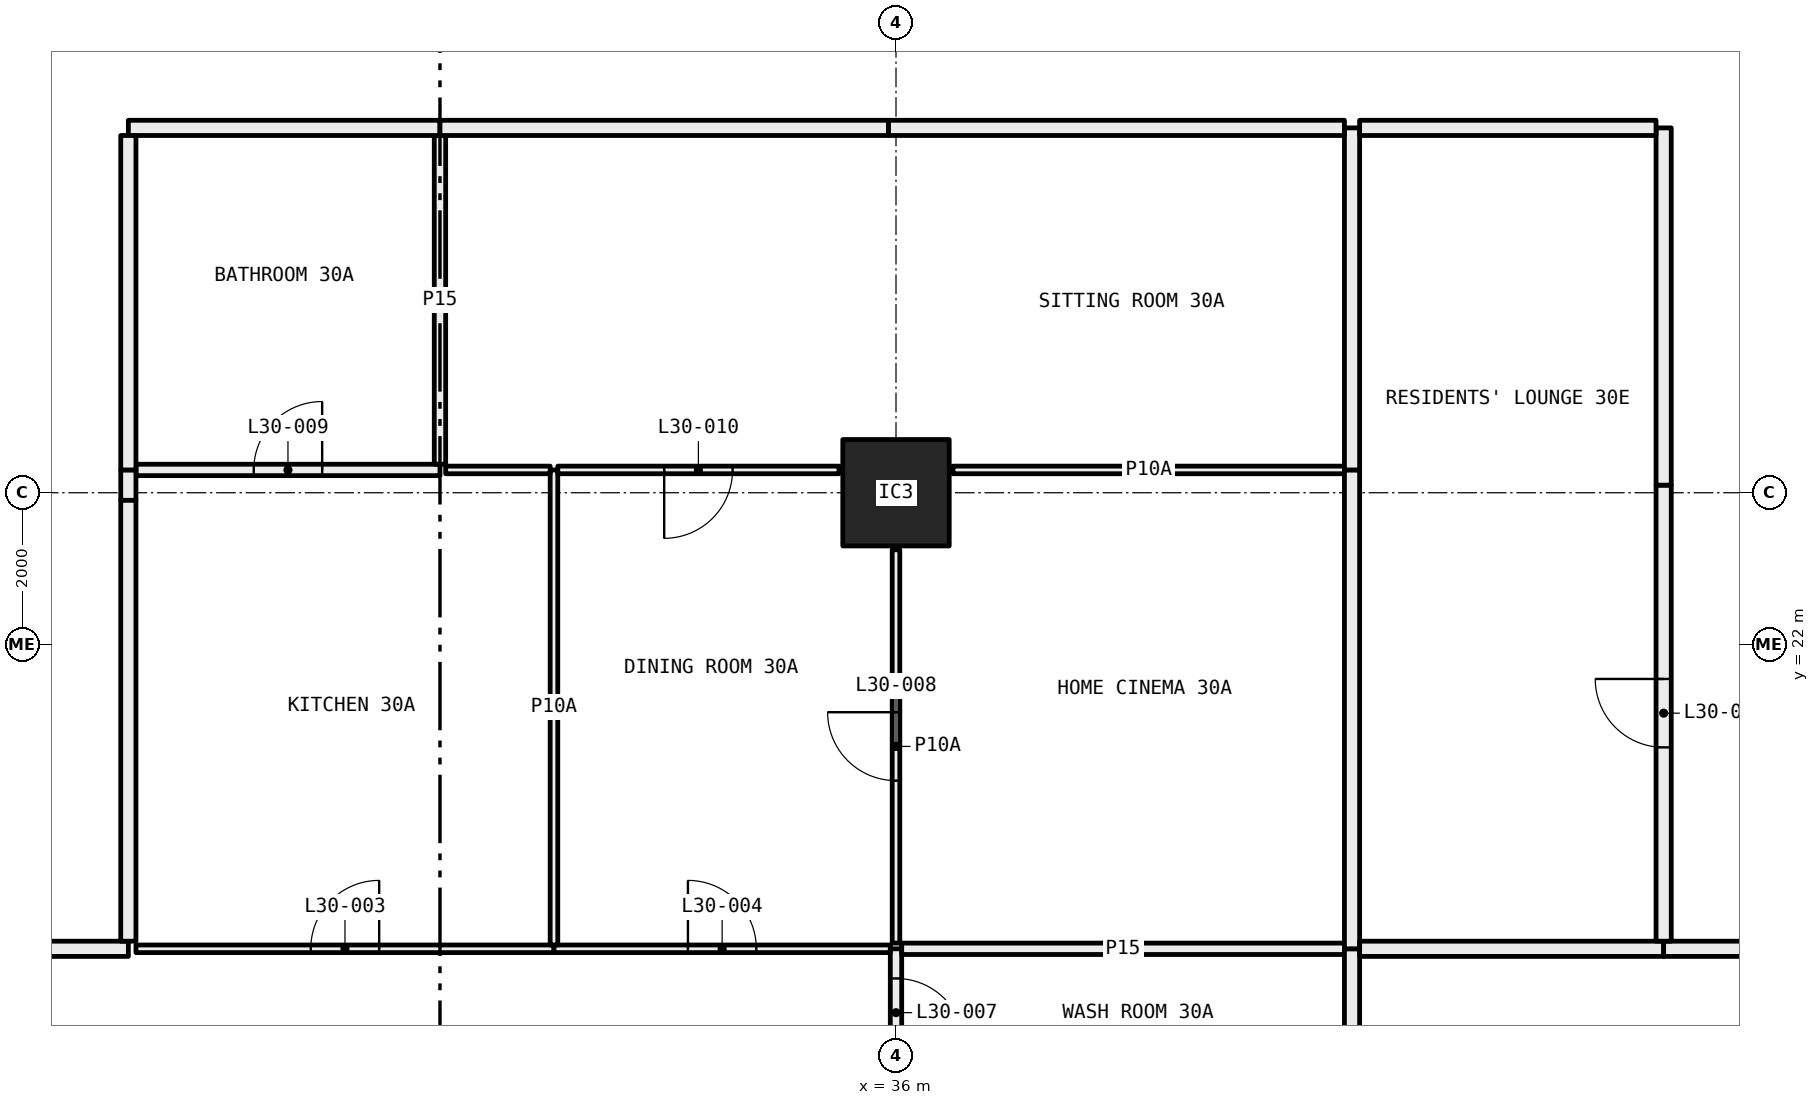
"""IFC4 building model, lengths in metres.
Left out: names, types, materials, properties, quantities, classifications, styles, units other than length and angle.
Written with IfcOpenShell. Run it as: python <this file> out.ifc"""

import sys

from ifc_helpers import new_model, si_unit, direction, frame, frame_2d, origin, origin_2d, place, context, subcontext, project, spatial, rectangle, hollow_rectangle, extrude, element, fill, save


model = new_model("IFC4")
c1 = context("Model", 3, precision=1e-05, world=origin(), true_north=direction((0.0, 1.0)))
c2 = subcontext(c1, "Body", "Model", "MODEL_VIEW")
j1 = project(units=[si_unit("LENGTHUNIT", "METRE"), si_unit("PLANEANGLEUNIT", "RADIAN")], contexts=[c1])
p1 = place(None, origin())
s1 = spatial("IfcSite", under=j1, at=p1, CompositionType="ELEMENT")
p2 = place(p1, origin())
s2 = spatial("IfcBuilding", under=s1, at=p2, CompositionType="ELEMENT")
p3 = place(p2, frame((0.0, 0.0, 117.3)))
s3 = spatial("IfcBuildingStorey", under=s2, at=p3, CompositionType="ELEMENT", Elevation=117.3)
p4 = place(p3, frame((36.0, 24.0, 0.0), z_axis=(0.0, 0.0, 1.0), x_axis=(1.0, 0.0, 0.0)))
e1 = element("IfcColumn", 1, at=p4, inside=s3, PredefinedType="COLUMN", context=c2, shape_type="SweptSolid", body=[
    extrude(hollow_rectangle(XDim=1.4, YDim=1.4, WallThickness=0.06, at=origin_2d()), origin(), (0.0, 0.0, 1.0), 3.05),
])
p5 = place(p3, frame((36.0, 16.32, 0.0), z_axis=(0.0, 0.0, 1.0), x_axis=(0.0, 1.0, 0.0)))
e2 = element("IfcWall", 2, at=p5, inside=s3, PredefinedType="PARTITIONING", context=c2, shape_type="SweptSolid", body=[
    extrude(rectangle(XDim=1.68, YDim=0.15, at=frame_2d((0.84, 0.0))), origin(), (0.0, 0.0, 1.0), 2.45),
])
p6 = place(p5, frame((0.39, 0.0, 0.0)))
e3 = element("IfcOpeningElement", 3, at=p6, cuts=e2, PredefinedType="OPENING", context=c2, shape_type="SweptSolid", body=[
    extrude(rectangle(XDim=0.9, YDim=2.1, at=frame_2d((0.45, 1.05))), frame((0.0, 0.085, 0.0), z_axis=(0.0, -1.0, 0.0), x_axis=(1.0, 0.0, 0.0)), (0.0, 0.0, 1.0), 0.17),
])
p7 = place(p3, frame((31.5, 18.0, 0.0), z_axis=(0.0, 0.0, 1.0), x_axis=(-1.0, 0.0, 0.0)))
e4 = element("IfcWall", 4, at=p7, inside=s3, PredefinedType="PARTITIONING", context=c2, shape_type="SweptSolid", body=[
    extrude(rectangle(XDim=5.5, YDim=0.1, at=frame_2d((2.75, 0.0))), origin(), (0.0, 0.0, 1.0), 3.05),
])
p8 = place(p7, frame((2.3, 0.0, 0.0)))
e5 = element("IfcOpeningElement", 5, at=p8, cuts=e4, PredefinedType="OPENING", context=c2, shape_type="SweptSolid", body=[
    extrude(rectangle(XDim=0.9, YDim=2.1, at=frame_2d((0.45, 1.05))), frame((0.0, 0.06, 0.0), z_axis=(0.0, -1.0, 0.0), x_axis=(1.0, 0.0, 0.0)), (0.0, 0.0, 1.0), 0.12),
])
p9 = place(p3, frame((35.925, 18.0, 0.0), z_axis=(0.0, 0.0, 1.0), x_axis=(-1.0, 0.0, 0.0)))
e6 = element("IfcWall", 6, at=p9, inside=s3, PredefinedType="PARTITIONING", context=c2, shape_type="SweptSolid", body=[
    extrude(rectangle(XDim=4.425, YDim=0.1, at=frame_2d((2.212, 0.0))), origin(), (0.0, 0.0, 1.0), 2.45),
])
p10 = place(p9, frame((1.762, 0.0, 0.0)))
e7 = element("IfcOpeningElement", 7, at=p10, cuts=e6, PredefinedType="OPENING", context=c2, shape_type="SweptSolid", body=[
    extrude(rectangle(XDim=0.9, YDim=2.1, at=frame_2d((0.45, 1.05))), frame((0.0, 0.06, 0.0), z_axis=(0.0, -1.0, 0.0), x_axis=(1.0, 0.0, 0.0)), (0.0, 0.0, 1.0), 0.12),
])
p11 = place(p3, frame((25.9, 18.0, 0.0), z_axis=(0.0, 0.0, 1.0), x_axis=(-1.0, 0.0, 0.0)))
e8 = element("IfcWall", 8, at=p11, inside=s3, PredefinedType="PARTITIONING", context=c2, shape_type="SweptSolid", body=[
    extrude(rectangle(XDim=1.9, YDim=0.2, at=frame_2d((0.95, 0.0))), origin(), (0.0, 0.0, 1.0), 3.05),
])
p12 = place(p3, frame((41.9, 18.0, 0.0), z_axis=(0.0, 0.0, 1.0), x_axis=(-1.0, 0.0, 0.0)))
e9 = element("IfcWall", 9, at=p12, inside=s3, PredefinedType="PARTITIONING", context=c2, shape_type="SweptSolid", body=[
    extrude(rectangle(XDim=5.825, YDim=0.15, at=frame_2d((2.913, 0.0))), origin(), (0.0, 0.0, 1.0), 2.45),
])
p13 = place(p3, frame((42.0, 16.32, 0.0), z_axis=(0.0, 0.0, 1.0), x_axis=(0.0, 1.0, 0.0)))
e10 = element("IfcWall", 10, at=p13, inside=s3, PredefinedType="PARTITIONING", context=c2, shape_type="SweptSolid", body=[
    extrude(rectangle(XDim=1.68, YDim=0.2, at=frame_2d((0.84, 0.0))), origin(), (0.0, 0.0, 1.0), 3.05),
])
p14 = place(p3, frame((31.5, 18.05, 0.0), z_axis=(0.0, 0.0, 1.0), x_axis=(0.0, 1.0, 0.0)))
e11 = element("IfcWall", 11, at=p14, inside=s3, PredefinedType="PARTITIONING", context=c2, shape_type="SweptSolid", body=[
    extrude(rectangle(XDim=6.25, YDim=0.1, at=frame_2d((3.125, 0.0))), origin(), (0.0, 0.0, 1.0), 2.45),
])
p15 = place(p3, frame((30.0, 24.3, 0.0), z_axis=(0.0, 0.0, 1.0), x_axis=(-1.0, 0.0, 0.0)))
e12 = element("IfcWall", 12, at=p15, inside=s3, PredefinedType="PARTITIONING", context=c2, shape_type="SweptSolid", body=[
    extrude(rectangle(XDim=4.0, YDim=0.15, at=frame_2d((2.0, 0.0))), origin(), (0.0, 0.0, 1.0), 3.05),
])
p16 = place(p15, frame((1.55, 0.0, 0.0)))
e13 = element("IfcOpeningElement", 13, at=p16, cuts=e12, PredefinedType="OPENING", context=c2, shape_type="SweptSolid", body=[
    extrude(rectangle(XDim=0.9, YDim=2.1, at=frame_2d((0.45, 1.05))), frame((0.0, 0.085, 0.0), z_axis=(0.0, -1.0, 0.0), x_axis=(1.0, 0.0, 0.0)), (0.0, 0.0, 1.0), 0.17),
])
p17 = place(p3, frame((31.45, 24.3, 0.0), z_axis=(0.0, 0.0, 1.0), x_axis=(-1.0, 0.0, 0.0)))
e14 = element("IfcWall", 14, at=p17, inside=s3, PredefinedType="PARTITIONING", context=c2, shape_type="SweptSolid", body=[
    extrude(rectangle(XDim=1.375, YDim=0.1, at=frame_2d((0.688, 0.0))), origin(), (0.0, 0.0, 1.0), 3.05),
])
p18 = place(p3, frame((25.9, 24.3, 0.0), z_axis=(0.0, 0.0, 1.0), x_axis=(0.0, -1.0, 0.0)))
e15 = element("IfcWall", 15, at=p18, inside=s3, PredefinedType="PARTITIONING", context=c2, shape_type="SweptSolid", body=[
    extrude(rectangle(XDim=0.4, YDim=0.2, at=frame_2d((0.2, 0.0))), origin(), (0.0, 0.0, 1.0), 2.45),
])
p19 = place(p3, frame((25.9, 23.9, 0.0), z_axis=(0.0, 0.0, 1.0), x_axis=(0.0, -1.0, 0.0)))
e16 = element("IfcWall", 16, at=p19, inside=s3, PredefinedType="PARTITIONING", context=c2, shape_type="SweptSolid", body=[
    extrude(rectangle(XDim=5.8, YDim=0.2, at=frame_2d((2.9, 0.0))), origin(), (0.0, 0.0, 1.0), 3.05),
])
p20 = place(p3, frame((36.0, 18.075, 0.0), z_axis=(0.0, 0.0, 1.0), x_axis=(0.0, 1.0, 0.0)))
e17 = element("IfcWall", 17, at=p20, inside=s3, PredefinedType="PARTITIONING", context=c2, shape_type="SweptSolid", body=[
    extrude(rectangle(XDim=5.175, YDim=0.1, at=frame_2d((2.587, 0.0))), origin(), (0.0, 0.0, 1.0), 2.45),
])
p21 = place(p20, frame((2.137, 0.0, 0.0)))
e18 = element("IfcOpeningElement", 18, at=p21, cuts=e17, PredefinedType="OPENING", context=c2, shape_type="SweptSolid", body=[
    extrude(rectangle(XDim=0.9, YDim=2.1, at=frame_2d((0.45, 1.05))), frame((0.0, 0.06, 0.0), z_axis=(0.0, -1.0, 0.0), x_axis=(1.0, 0.0, 0.0)), (0.0, 0.0, 1.0), 0.12),
])
p22 = place(p3, frame((35.25, 24.3, 0.0), z_axis=(0.0, 0.0, 1.0), x_axis=(-1.0, 0.0, 0.0)))
e19 = element("IfcWall", 19, at=p22, inside=s3, PredefinedType="PARTITIONING", context=c2, shape_type="SweptSolid", body=[
    extrude(rectangle(XDim=3.7, YDim=0.1, at=frame_2d((1.85, 0.0))), origin(), (0.0, 0.0, 1.0), 3.05),
])
p23 = place(p22, frame((1.4, 0.0, 0.0)))
e20 = element("IfcOpeningElement", 20, at=p23, cuts=e19, PredefinedType="OPENING", context=c2, shape_type="SweptSolid", body=[
    extrude(rectangle(XDim=0.9, YDim=2.1, at=frame_2d((0.45, 1.05))), frame((0.0, 0.06, 0.0), z_axis=(0.0, -1.0, 0.0), x_axis=(1.0, 0.0, 0.0)), (0.0, 0.0, 1.0), 0.12),
])
p24 = place(p3, frame((41.9, 24.3, 0.0), z_axis=(0.0, 0.0, 1.0), x_axis=(-1.0, 0.0, 0.0)))
e21 = element("IfcWall", 21, at=p24, inside=s3, PredefinedType="PARTITIONING", context=c2, shape_type="SweptSolid", body=[
    extrude(rectangle(XDim=5.15, YDim=0.1, at=frame_2d((2.575, 0.0))), origin(), (0.0, 0.0, 1.0), 3.05),
])
p25 = place(p3, frame((42.0, 18.0, 0.0), z_axis=(0.0, 0.0, 1.0), x_axis=(0.0, 1.0, 0.0)))
e22 = element("IfcWall", 22, at=p25, inside=s3, PredefinedType="PARTITIONING", context=c2, shape_type="SweptSolid", body=[
    extrude(rectangle(XDim=6.3, YDim=0.2, at=frame_2d((3.15, 0.0))), origin(), (0.0, 0.0, 1.0), 2.45),
])
p26 = place(p3, frame((30.0, 24.375, 0.0), z_axis=(0.0, 0.0, 1.0), x_axis=(0.0, 1.0, 0.0)))
e23 = element("IfcWall", 23, at=p26, inside=s3, PredefinedType="PARTITIONING", context=c2, shape_type="SweptSolid", body=[
    extrude(rectangle(XDim=4.325, YDim=0.15, at=frame_2d((2.163, 0.0))), origin(), (0.0, 0.0, 1.0), 3.05),
])
p27 = place(p3, frame((30.0, 28.8, 0.0), z_axis=(0.0, 0.0, 1.0), x_axis=(-1.0, 0.0, 0.0)))
e24 = element("IfcWall", 24, at=p27, inside=s3, PredefinedType="PARTITIONING", context=c2, shape_type="SweptSolid", body=[
    extrude(rectangle(XDim=4.1, YDim=0.2, at=frame_2d((2.05, 0.0))), origin(), (0.0, 0.0, 1.0), 3.05),
])
p28 = place(p3, frame((25.9, 28.7, 0.0), z_axis=(0.0, 0.0, 1.0), x_axis=(0.0, -1.0, 0.0)))
e25 = element("IfcWall", 25, at=p28, inside=s3, PredefinedType="PARTITIONING", context=c2, shape_type="SweptSolid", body=[
    extrude(rectangle(XDim=4.4, YDim=0.2, at=frame_2d((2.2, 0.0))), origin(), (0.0, 0.0, 1.0), 3.05),
])
p29 = place(p3, frame((42.0, 24.3, 0.0), z_axis=(0.0, 0.0, 1.0), x_axis=(0.0, 1.0, 0.0)))
e26 = element("IfcWall", 26, at=p29, inside=s3, PredefinedType="PARTITIONING", context=c2, shape_type="SweptSolid", body=[
    extrude(rectangle(XDim=4.5, YDim=0.2, at=frame_2d((2.25, 0.0))), origin(), (0.0, 0.0, 1.0), 3.05),
])
p30 = place(p3, frame((41.9, 28.8, 0.0), z_axis=(0.0, 0.0, 1.0), x_axis=(-1.0, 0.0, 0.0)))
e27 = element("IfcWall", 27, at=p30, inside=s3, PredefinedType="PARTITIONING", context=c2, shape_type="SweptSolid", body=[
    extrude(rectangle(XDim=6.0, YDim=0.2, at=frame_2d((3.0, 0.0))), origin(), (0.0, 0.0, 1.0), 2.45),
])
p31 = place(p3, frame((35.9, 28.8, 0.0), z_axis=(0.0, 0.0, 1.0), x_axis=(-1.0, 0.0, 0.0)))
e28 = element("IfcWall", 28, at=p31, inside=s3, PredefinedType="PARTITIONING", context=c2, shape_type="SweptSolid", body=[
    extrude(rectangle(XDim=5.9, YDim=0.2, at=frame_2d((2.95, 0.0))), origin(), (0.0, 0.0, 1.0), 3.05),
])
p32 = place(p3, frame((46.1, 18.0, 0.0), z_axis=(0.0, 0.0, 1.0), x_axis=(-1.0, 0.0, 0.0)))
e29 = element("IfcWall", 29, at=p32, inside=s3, PredefinedType="PARTITIONING", context=c2, shape_type="SweptSolid", body=[
    extrude(rectangle(XDim=4.0, YDim=0.2, at=frame_2d((2.0, 0.0))), origin(), (0.0, 0.0, 1.0), 3.05),
])
p33 = place(p3, frame((48.0, 18.0, 0.0), z_axis=(0.0, 0.0, 1.0), x_axis=(-1.0, 0.0, 0.0)))
e30 = element("IfcWall", 30, at=p33, inside=s3, PredefinedType="PARTITIONING", context=c2, shape_type="SweptSolid", body=[
    extrude(rectangle(XDim=1.9, YDim=0.2, at=frame_2d((0.95, 0.0))), origin(), (0.0, 0.0, 1.0), 3.05),
])
p34 = place(p3, frame((46.1, 18.1, 0.0), z_axis=(0.0, 0.0, 1.0), x_axis=(0.0, 1.0, 0.0)))
e31 = element("IfcWall", 31, at=p34, inside=s3, PredefinedType="PARTITIONING", context=c2, shape_type="SweptSolid", body=[
    extrude(rectangle(XDim=6.0, YDim=0.2, at=frame_2d((3.0, 0.0))), origin(), (0.0, 0.0, 1.0), 2.45),
])
p35 = place(p34, frame((2.55, 0.0, 0.0)))
e32 = element("IfcOpeningElement", 32, at=p35, cuts=e31, PredefinedType="OPENING", context=c2, shape_type="SweptSolid", body=[
    extrude(rectangle(XDim=0.9, YDim=2.1, at=frame_2d((0.45, 1.05))), frame((0.0, 0.11, 0.0), z_axis=(0.0, -1.0, 0.0), x_axis=(1.0, 0.0, 0.0)), (0.0, 0.0, 1.0), 0.22),
])
p36 = place(p3, frame((46.1, 24.1, 0.0), z_axis=(0.0, 0.0, 1.0), x_axis=(0.0, 1.0, 0.0)))
e33 = element("IfcWall", 33, at=p36, inside=s3, PredefinedType="PARTITIONING", context=c2, shape_type="SweptSolid", body=[
    extrude(rectangle(XDim=4.7, YDim=0.2, at=frame_2d((2.35, 0.0))), origin(), (0.0, 0.0, 1.0), 3.05),
])
p37 = place(p3, frame((46.0, 28.8, 0.0), z_axis=(0.0, 0.0, 1.0), x_axis=(-1.0, 0.0, 0.0)))
e34 = element("IfcWall", 34, at=p37, inside=s3, PredefinedType="PARTITIONING", context=c2, shape_type="SweptSolid", body=[
    extrude(rectangle(XDim=3.9, YDim=0.2, at=frame_2d((1.95, 0.0))), origin(), (0.0, 0.0, 1.0), 3.05),
])
p38 = place(p8, frame((0.9, 0.0, 0.0), x_axis=(-1.0, 0.0, 0.0)))
e35 = element("IfcDoor", 35, at=p38, inside=s3, OperationType="SINGLE_SWING_LEFT", PredefinedType="DOOR", context=c2, shape_type="SweptSolid", body=[
    extrude(rectangle(XDim=0.9, YDim=2.1, at=frame_2d((0.45, 1.05))), frame((0.0, 0.025, 0.0), z_axis=(0.0, -1.0, 0.0), x_axis=(1.0, 0.0, 0.0)), (0.0, 0.0, 1.0), 0.05),
])
fill(e5, e35)
p39 = place(p10, frame((0.9, 0.0, 0.0), x_axis=(-1.0, 0.0, 0.0)))
e36 = element("IfcDoor", 36, at=p39, inside=s3, OperationType="SINGLE_SWING_RIGHT", PredefinedType="DOOR", context=c2, shape_type="SweptSolid", body=[
    extrude(rectangle(XDim=0.9, YDim=2.1, at=frame_2d((0.45, 1.05))), frame((0.0, 0.025, 0.0), z_axis=(0.0, -1.0, 0.0), x_axis=(1.0, 0.0, 0.0)), (0.0, 0.0, 1.0), 0.05),
])
fill(e7, e36)
p40 = place(p6, frame((0.9, 0.0, 0.0), x_axis=(-1.0, 0.0, 0.0)))
e37 = element("IfcDoor", 37, at=p40, inside=s3, OperationType="SINGLE_SWING_LEFT", PredefinedType="DOOR", context=c2, shape_type="SweptSolid", body=[
    extrude(rectangle(XDim=0.9, YDim=2.1, at=frame_2d((0.45, 1.05))), frame((0.0, 0.025, 0.0), z_axis=(0.0, -1.0, 0.0), x_axis=(1.0, 0.0, 0.0)), (0.0, 0.0, 1.0), 0.05),
])
fill(e3, e37)
p41 = place(p21, origin())
e38 = element("IfcDoor", 38, at=p41, inside=s3, OperationType="SINGLE_SWING_LEFT", PredefinedType="DOOR", context=c2, shape_type="SweptSolid", body=[
    extrude(rectangle(XDim=0.9, YDim=2.1, at=frame_2d((0.45, 1.05))), frame((0.0, 0.025, 0.0), z_axis=(0.0, -1.0, 0.0), x_axis=(1.0, 0.0, 0.0)), (0.0, 0.0, 1.0), 0.05),
])
fill(e18, e38)
p42 = place(p16, frame((0.9, 0.0, 0.0), x_axis=(-1.0, 0.0, 0.0)))
e39 = element("IfcDoor", 39, at=p42, inside=s3, OperationType="SINGLE_SWING_LEFT", PredefinedType="DOOR", context=c2, shape_type="SweptSolid", body=[
    extrude(rectangle(XDim=0.9, YDim=2.1, at=frame_2d((0.45, 1.05))), frame((0.0, 0.025, 0.0), z_axis=(0.0, -1.0, 0.0), x_axis=(1.0, 0.0, 0.0)), (0.0, 0.0, 1.0), 0.05),
])
fill(e13, e39)
p43 = place(p23, origin())
e40 = element("IfcDoor", 40, at=p43, inside=s3, OperationType="SINGLE_SWING_LEFT", PredefinedType="DOOR", context=c2, shape_type="SweptSolid", body=[
    extrude(rectangle(XDim=0.9, YDim=2.1, at=frame_2d((0.45, 1.05))), frame((0.0, 0.025, 0.0), z_axis=(0.0, -1.0, 0.0), x_axis=(1.0, 0.0, 0.0)), (0.0, 0.0, 1.0), 0.05),
])
fill(e20, e40)
p44 = place(p35, origin())
e41 = element("IfcDoor", 41, at=p44, inside=s3, OperationType="SINGLE_SWING_LEFT", PredefinedType="DOOR", context=c2, shape_type="SweptSolid", body=[
    extrude(rectangle(XDim=0.9, YDim=2.1, at=frame_2d((0.45, 1.05))), frame((0.0, 0.025, 0.0), z_axis=(0.0, -1.0, 0.0), x_axis=(1.0, 0.0, 0.0)), (0.0, 0.0, 1.0), 0.05),
])
fill(e32, e41)
save(model, sys.argv[1])
